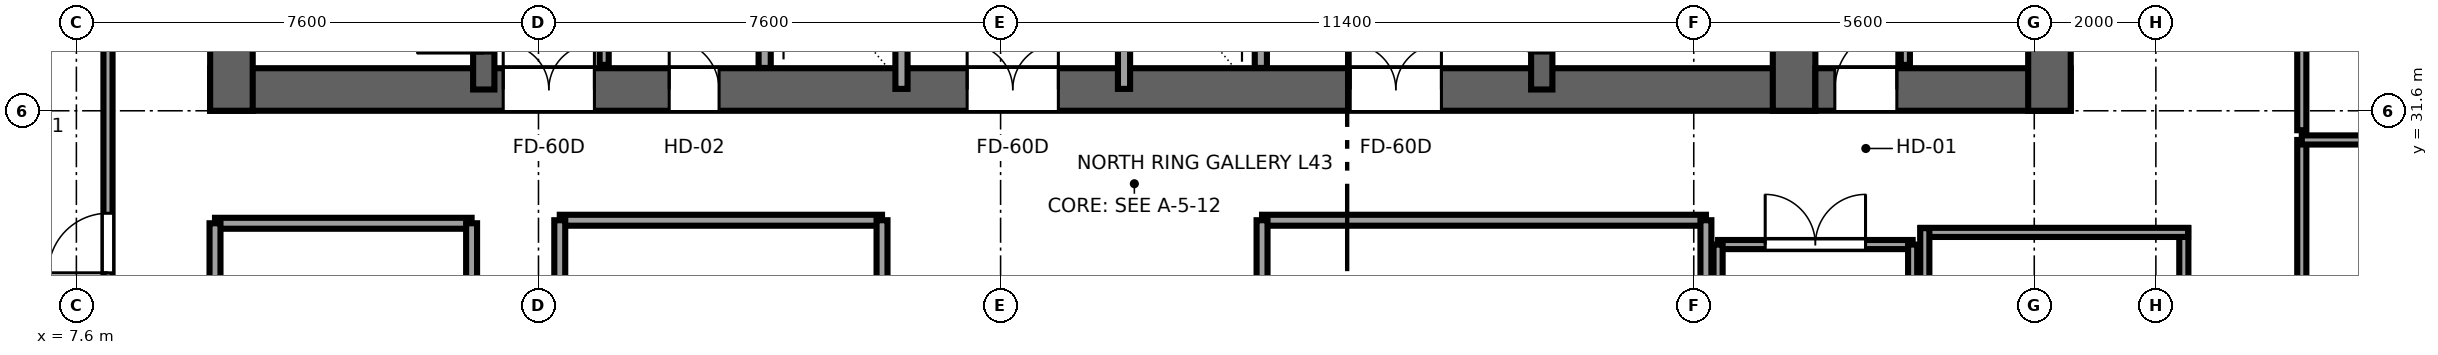
"""IFC4 building model, lengths in metres.
Left out: names, types, materials, properties, quantities, classifications, styles, units other than length and angle.
Written with IfcOpenShell. Run it as: python <this file> out.ifc"""

import sys

from ifc_helpers import new_model, si_unit, direction, frame, frame_2d, origin, place, context, subcontext, project, spatial, rectangle, extrude, source, transform, mapped, element, fill, save


model = new_model("IFC4")
c1 = context("Model", 3, precision=1e-05, world=origin(), true_north=direction((0.0, 1.0)))
c2 = subcontext(c1, "Body", "Model", "MODEL_VIEW")
j1 = project(units=[si_unit("LENGTHUNIT", "METRE"), si_unit("PLANEANGLEUNIT", "RADIAN")], contexts=[c1])
p1 = place(None, origin())
s1 = spatial("IfcSite", under=j1, at=p1, CompositionType="ELEMENT")
p2 = place(p1, origin())
s2 = spatial("IfcBuilding", under=s1, at=p2, CompositionType="ELEMENT")
p3 = place(p2, frame((0.0, 0.0, 164.8)))
s3 = spatial("IfcBuildingStorey", under=s2, at=p3, CompositionType="ELEMENT", Elevation=164.8)
p4 = place(p3, frame((9.8, 31.95, 0.0), z_axis=(0.0, 0.0, 1.0), x_axis=(1.0, 0.0, 0.0)))
e1 = element("IfcWall", 1, at=p4, inside=s3, PredefinedType="SHEAR", context=c2, shape_type="SweptSolid", body=[
    extrude(rectangle(XDim=26.4, YDim=0.7, at=frame_2d((13.2, 0.0))), origin(), (0.0, 0.0, 1.0), 3.55),
])
p5 = place(p4, frame((6.32, 0.0, 0.0), z_axis=(0.0, 0.0, 1.0), x_axis=(-1.0, 0.0, 0.0)))
e2 = element("IfcOpeningElement", 2, at=p5, cuts=e1, PredefinedType="OPENING", context=c2, shape_type="SweptSolid", body=[
    extrude(rectangle(XDim=1.5, YDim=2.04, at=frame_2d((0.75, 1.02))), frame((0.0, 0.36, 0.0), z_axis=(0.0, -1.0, 0.0), x_axis=(1.0, 0.0, 0.0)), (0.0, 0.0, 1.0), 0.72),
])
p6 = place(p4, frame((13.95, 0.0, 0.0), z_axis=(0.0, 0.0, 1.0), x_axis=(-1.0, 0.0, 0.0)))
e3 = element("IfcOpeningElement", 3, at=p6, cuts=e1, PredefinedType="OPENING", context=c2, shape_type="SweptSolid", body=[
    extrude(rectangle(XDim=1.5, YDim=2.04, at=frame_2d((0.75, 1.02))), frame((0.0, 0.36, 0.0), z_axis=(0.0, -1.0, 0.0), x_axis=(1.0, 0.0, 0.0)), (0.0, 0.0, 1.0), 0.72),
])
p7 = place(p4, frame((20.25, 0.0, 0.0), z_axis=(0.0, 0.0, 1.0), x_axis=(-1.0, 0.0, 0.0)))
e4 = element("IfcOpeningElement", 4, at=p7, cuts=e1, PredefinedType="OPENING", context=c2, shape_type="SweptSolid", body=[
    extrude(rectangle(XDim=1.5, YDim=2.04, at=frame_2d((0.75, 1.02))), frame((0.0, 0.36, 0.0), z_axis=(0.0, -1.0, 0.0), x_axis=(1.0, 0.0, 0.0)), (0.0, 0.0, 1.0), 0.72),
])
p8 = place(p4, frame((8.37, 0.0, 0.0), z_axis=(0.0, 0.0, 1.0), x_axis=(-1.0, 0.0, 0.0)))
e5 = element("IfcOpeningElement", 5, at=p8, cuts=e1, PredefinedType="OPENING", context=c2, shape_type="SweptSolid", body=[
    extrude(rectangle(XDim=0.82, YDim=2.01, at=frame_2d((0.41, 1.005))), frame((0.0, 0.36, 0.0), z_axis=(0.0, -1.0, 0.0), x_axis=(1.0, 0.0, 0.0)), (0.0, 0.0, 1.0), 0.72),
])
for number, where, z_axis, x_axis in (
    (6, (10.15, 31.6, 0.0), (0.0, 0.0, 1.0), (0.0, 1.0, 0.0)),
    (7, (35.85, 31.6, 0.0), (0.0, 0.0, 1.0), (0.0, 1.0, 0.0)),
):
    element("IfcWall", number, at=place(p3, frame(where, z_axis=z_axis, x_axis=x_axis)), inside=s3, PredefinedType="SHEAR", context=c2, shape_type="SweptSolid", body=[
        extrude(rectangle(XDim=13.6, YDim=0.7, at=frame_2d((6.8, 0.0))), origin(), (0.0, 0.0, 1.0), 3.55),
    ])
p9 = place(p3, frame((14.3, 31.95, 0.0), z_axis=(0.0, 0.0, 1.0), x_axis=(0.0, 1.0, 0.0)))
e8 = element("IfcWall", 8, at=p9, inside=s3, PredefinedType="SHEAR", context=c2, shape_type="SweptSolid", body=[
    extrude(rectangle(XDim=12.9, YDim=0.35, at=frame_2d((6.45, 0.0))), origin(), (0.0, 0.0, 1.0), 3.55),
])
p10 = place(p9, frame((0.6, 0.0, 0.0)))
e9 = element("IfcOpeningElement", 9, at=p10, cuts=e8, PredefinedType="OPENING", context=c2, shape_type="SweptSolid", body=[
    extrude(rectangle(XDim=1.1, YDim=2.12, at=frame_2d((0.55, 1.06))), frame((0.0, 0.185, 0.0), z_axis=(0.0, -1.0, 0.0), x_axis=(1.0, 0.0, 0.0)), (0.0, 0.0, 1.0), 0.37),
])
p11 = place(p3, frame((31.7, 31.95, 0.0), z_axis=(0.0, 0.0, 1.0), x_axis=(0.0, 1.0, 0.0)))
e10 = element("IfcWall", 10, at=p11, inside=s3, PredefinedType="SHEAR", context=c2, shape_type="SweptSolid", body=[
    extrude(rectangle(XDim=12.9, YDim=0.35, at=frame_2d((6.45, 0.0))), origin(), (0.0, 0.0, 1.0), 3.55),
])
p12 = place(p11, frame((1.7, 0.0, 0.0), z_axis=(0.0, 0.0, 1.0), x_axis=(-1.0, 0.0, 0.0)))
e11 = element("IfcOpeningElement", 11, at=p12, cuts=e10, PredefinedType="OPENING", context=c2, shape_type="SweptSolid", body=[
    extrude(rectangle(XDim=1.1, YDim=2.12, at=frame_2d((0.55, 1.06))), frame((0.0, 0.185, 0.0), z_axis=(0.0, -1.0, 0.0), x_axis=(1.0, 0.0, 0.0)), (0.0, 0.0, 1.0), 0.37),
])
p13 = place(p3, frame((36.2, 31.95, 0.0), z_axis=(0.0, 0.0, 1.0), x_axis=(1.0, 0.0, 0.0)))
e12 = element("IfcWall", 12, at=p13, inside=s3, PredefinedType="SHEAR", context=c2, shape_type="SweptSolid", body=[
    extrude(rectangle(XDim=4.2, YDim=0.7, at=frame_2d((2.1, 0.0))), origin(), (0.0, 0.0, 1.0), 3.55),
])
p14 = place(p13, frame((1.34, 0.0, 0.0), z_axis=(0.0, 0.0, 1.0), x_axis=(-1.0, 0.0, 0.0)))
e13 = element("IfcOpeningElement", 13, at=p14, cuts=e12, PredefinedType="OPENING", context=c2, shape_type="SweptSolid", body=[
    extrude(rectangle(XDim=1.02, YDim=2.03, at=frame_2d((0.51, 1.015))), frame((0.0, 0.36, 0.0), z_axis=(0.0, -1.0, 0.0), x_axis=(1.0, 0.0, 0.0)), (0.0, 0.0, 1.0), 0.72),
])
p15 = place(p3, frame((40.05, 31.6, 0.0), z_axis=(0.0, 0.0, 1.0), x_axis=(0.0, 1.0, 0.0)))
e14 = element("IfcWall", 14, at=p15, inside=s3, PredefinedType="SHEAR", context=c2, shape_type="SweptSolid", body=[
    extrude(rectangle(XDim=13.6, YDim=0.7, at=frame_2d((6.8, 0.0))), origin(), (0.0, 0.0, 1.0), 3.55),
])
for number, where, z_axis, x_axis in (
    (15, (18.92, 32.304, 0.0), (0.0, 0.0, 1.0), (0.0, 1.0, 0.0)),
    (16, (27.08, 32.304, 0.0), (0.0, 0.0, 1.0), (0.0, 1.0, 0.0)),
):
    element("IfcWall", number, at=place(p3, frame(where, z_axis=z_axis, x_axis=x_axis)), inside=s3, PredefinedType="SOLIDWALL", context=c2, shape_type="SweptSolid", body=[
        extrude(rectangle(XDim=3.846, YDim=0.2, at=frame_2d((1.923, 0.0))), origin(), (0.0, 0.0, 1.0), 3.37),
    ])
p16 = place(p3, frame((21.17, 31.96, 0.0), z_axis=(0.0, 0.0, 1.0), x_axis=(0.0, 1.0, 0.0)))
e17 = element("IfcWall", 17, at=p16, inside=s3, PredefinedType="SOLIDWALL", context=c2, shape_type="SweptSolid", body=[
    extrude(rectangle(XDim=12.58, YDim=0.2, at=frame_2d((6.29, 0.0))), origin(), (0.0, 0.0, 1.0), 3.37),
])
p17 = place(p16, frame((5.74, 0.0, 0.0)))
e18 = element("IfcOpeningElement", 18, at=p17, cuts=e17, PredefinedType="OPENING", context=c2, shape_type="SweptSolid", body=[
    extrude(rectangle(XDim=1.1, YDim=2.12, at=frame_2d((0.55, 1.06))), frame((0.0, 0.11, 0.0), z_axis=(0.0, -1.0, 0.0), x_axis=(1.0, 0.0, 0.0)), (0.0, 0.0, 1.0), 0.22),
])
p18 = place(p16, frame((8.24, 0.0, 0.0)))
e19 = element("IfcOpeningElement", 19, at=p18, cuts=e17, PredefinedType="OPENING", context=c2, shape_type="SweptSolid", body=[
    extrude(rectangle(XDim=1.1, YDim=2.12, at=frame_2d((0.55, 1.06))), frame((0.0, 0.11, 0.0), z_axis=(0.0, -1.0, 0.0), x_axis=(1.0, 0.0, 0.0)), (0.0, 0.0, 1.0), 0.22),
])
p19 = place(p3, frame((24.83, 31.96, 0.0), z_axis=(0.0, 0.0, 1.0), x_axis=(0.0, 1.0, 0.0)))
e20 = element("IfcWall", 20, at=p19, inside=s3, PredefinedType="SOLIDWALL", context=c2, shape_type="SweptSolid", body=[
    extrude(rectangle(XDim=12.58, YDim=0.2, at=frame_2d((6.29, 0.0))), origin(), (0.0, 0.0, 1.0), 3.37),
])
p20 = place(p19, frame((5.74, 0.0, 0.0)))
e21 = element("IfcOpeningElement", 21, at=p20, cuts=e20, PredefinedType="OPENING", context=c2, shape_type="SweptSolid", body=[
    extrude(rectangle(XDim=1.1, YDim=2.12, at=frame_2d((0.55, 1.06))), frame((0.0, 0.11, 0.0), z_axis=(0.0, -1.0, 0.0), x_axis=(1.0, 0.0, 0.0)), (0.0, 0.0, 1.0), 0.22),
])
p21 = place(p19, frame((8.24, 0.0, 0.0)))
e22 = element("IfcOpeningElement", 22, at=p21, cuts=e20, PredefinedType="OPENING", context=c2, shape_type="SweptSolid", body=[
    extrude(rectangle(XDim=1.1, YDim=2.12, at=frame_2d((0.55, 1.06))), frame((0.0, 0.11, 0.0), z_axis=(0.0, -1.0, 0.0), x_axis=(1.0, 0.0, 0.0)), (0.0, 0.0, 1.0), 0.22),
])
p22 = place(p3, frame((16.28, 32.355, 0.0), z_axis=(0.0, 0.0, 1.0), x_axis=(0.0, 1.0, 0.0)))
e23 = element("IfcWall", 23, at=p22, inside=s3, PredefinedType="PARTITIONING", context=c2, shape_type="SweptSolid", body=[
    extrude(rectangle(XDim=0.865, YDim=0.15, at=frame_2d((0.433, 0.0))), origin(), (0.0, 0.0, 1.0), 3.37),
])
p23 = place(p3, frame((37.68, 32.355, 0.0), z_axis=(0.0, 0.0, 1.0), x_axis=(0.0, 1.0, 0.0)))
e24 = element("IfcWall", 24, at=p23, inside=s3, PredefinedType="PARTITIONING", context=c2, shape_type="SweptSolid", body=[
    extrude(rectangle(XDim=3.845, YDim=0.15, at=frame_2d((1.922, 0.0))), origin(), (0.0, 0.0, 1.0), 3.37),
])
p24 = place(p23, frame((1.413, 0.0, 0.0)))
e25 = element("IfcOpeningElement", 25, at=p24, cuts=e24, PredefinedType="OPENING", context=c2, shape_type="SweptSolid", body=[
    extrude(rectangle(XDim=1.02, YDim=2.03, at=frame_2d((0.51, 1.015))), frame((0.0, 0.085, 0.0), z_axis=(0.0, -1.0, 0.0), x_axis=(1.0, 0.0, 0.0)), (0.0, 0.0, 1.0), 0.17),
])
p25 = place(p3, frame((8.12, 24.73, 0.0), z_axis=(0.0, 0.0, 1.0), x_axis=(0.0, 1.0, 0.0)))
e26 = element("IfcWall", 26, at=p25, inside=s3, PredefinedType="PARTITIONING", context=c2, shape_type="SweptSolid", body=[
    extrude(rectangle(XDim=9.39, YDim=0.15, at=frame_2d((4.695, 0.0))), origin(), (0.0, 0.0, 1.0), 3.37),
])
p26 = place(p25, frame((4.205, 0.0, 0.0)))
e27 = element("IfcOpeningElement", 27, at=p26, cuts=e26, PredefinedType="OPENING", context=c2, shape_type="SweptSolid", body=[
    extrude(rectangle(XDim=0.98, YDim=2.12, at=frame_2d((0.49, 1.06))), frame((0.0, 0.085, 0.0), z_axis=(0.0, -1.0, 0.0), x_axis=(1.0, 0.0, 0.0)), (0.0, 0.0, 1.0), 0.17),
])
p27 = place(p3, frame((44.2, 23.78, 0.0), z_axis=(0.0, 0.0, 1.0), x_axis=(0.0, 1.0, 0.0)))
e28 = element("IfcWall", 28, at=p27, inside=s3, PredefinedType="PARTITIONING", context=c2, shape_type="SweptSolid", body=[
    extrude(rectangle(XDim=7.34, YDim=0.15, at=frame_2d((3.67, 0.0))), origin(), (0.0, 0.0, 1.0), 3.37),
])
p28 = place(p27, frame((3.18, 0.0, 0.0)))
e29 = element("IfcOpeningElement", 29, at=p28, cuts=e28, PredefinedType="OPENING", context=c2, shape_type="SweptSolid", body=[
    extrude(rectangle(XDim=0.98, YDim=2.12, at=frame_2d((0.49, 1.06))), frame((0.0, 0.085, 0.0), z_axis=(0.0, -1.0, 0.0), x_axis=(1.0, 0.0, 0.0)), (0.0, 0.0, 1.0), 0.17),
])
p29 = place(p3, frame((44.2, 31.12, 0.0), z_axis=(0.0, 0.0, 1.0), x_axis=(1.0, 0.0, 0.0)))
e30 = element("IfcWall", 30, at=p29, inside=s3, PredefinedType="PARTITIONING", context=c2, shape_type="SweptSolid", body=[
    extrude(rectangle(XDim=7.43, YDim=0.15, at=frame_2d((3.715, 0.0))), origin(), (0.0, 0.0, 1.0), 3.37),
])
p30 = place(p3, frame((44.2, 31.28, 0.0), z_axis=(0.0, 0.0, 1.0), x_axis=(0.0, 1.0, 0.0)))
e31 = element("IfcWall", 31, at=p30, inside=s3, PredefinedType="PARTITIONING", context=c2, shape_type="SweptSolid", body=[
    extrude(rectangle(XDim=6.24, YDim=0.15, at=frame_2d((3.12, 0.0))), origin(), (0.0, 0.0, 1.0), 3.37),
])
p31 = place(p30, frame((2.63, 0.0, 0.0)))
e32 = element("IfcOpeningElement", 32, at=p31, cuts=e31, PredefinedType="OPENING", context=c2, shape_type="SweptSolid", body=[
    extrude(rectangle(XDim=0.98, YDim=2.12, at=frame_2d((0.49, 1.06))), frame((0.0, 0.085, 0.0), z_axis=(0.0, -1.0, 0.0), x_axis=(1.0, 0.0, 0.0)), (0.0, 0.0, 1.0), 0.17),
])
p32 = place(p3, frame((42.26, 25.93, 0.0), z_axis=(0.0, 0.0, 1.0), x_axis=(0.0, 1.0, 0.0)))
e33 = element("IfcWall", 33, at=p32, inside=s3, PredefinedType="PARTITIONING", context=c2, shape_type="SweptSolid", body=[
    extrude(rectangle(XDim=3.74, YDim=0.15, at=frame_2d((1.87, 0.0))), origin(), (0.0, 0.0, 1.0), 3.37),
])
p33 = place(p32, frame((1.19, 0.0, 0.0)))
e34 = element("IfcOpeningElement", 34, at=p33, cuts=e33, PredefinedType="OPENING", context=c2, shape_type="SweptSolid", body=[
    extrude(rectangle(XDim=0.92, YDim=2.01, at=frame_2d((0.46, 1.005))), frame((0.0, 0.085, 0.0), z_axis=(0.0, -1.0, 0.0), x_axis=(1.0, 0.0, 0.0)), (0.0, 0.0, 1.0), 0.17),
])
p34 = place(p3, frame((37.93, 29.6, 0.0), z_axis=(0.0, 0.0, 1.0), x_axis=(1.0, 0.0, 0.0)))
e35 = element("IfcWall", 35, at=p34, inside=s3, PredefinedType="PARTITIONING", context=c2, shape_type="SweptSolid", body=[
    extrude(rectangle(XDim=4.4, YDim=0.15, at=frame_2d((2.2, 0.0))), origin(), (0.0, 0.0, 1.0), 3.37),
])
p35 = place(p3, frame((38.0, 25.93, 0.0), z_axis=(0.0, 0.0, 1.0), x_axis=(0.0, 1.0, 0.0)))
e36 = element("IfcWall", 36, at=p35, inside=s3, PredefinedType="PARTITIONING", context=c2, shape_type="SweptSolid", body=[
    extrude(rectangle(XDim=3.74, YDim=0.15, at=frame_2d((1.87, 0.0))), origin(), (0.0, 0.0, 1.0), 3.37),
])
p36 = place(p3, frame((9.88, 29.75, 0.0), z_axis=(0.0, 0.0, 1.0), x_axis=(1.0, 0.0, 0.0)))
e37 = element("IfcWall", 37, at=p36, inside=s3, PredefinedType="PARTITIONING", context=c2, shape_type="SweptSolid", body=[
    extrude(rectangle(XDim=4.22, YDim=0.18, at=frame_2d((2.11, 0.0))), origin(), (0.0, 0.0, 1.0), 3.37),
])
for number, where, z_axis, x_axis in (
    (38, (9.88, 23.7, 0.0), (0.0, 0.0, 1.0), (0.0, 1.0, 0.0)),
    (39, (14.1, 23.7, 0.0), (0.0, 0.0, 1.0), (0.0, 1.0, 0.0)),
):
    element("IfcWall", number, at=place(p3, frame(where, z_axis=z_axis, x_axis=x_axis)), inside=s3, PredefinedType="PARTITIONING", context=c2, shape_type="SweptSolid", body=[
        extrude(rectangle(XDim=6.05, YDim=0.18, at=frame_2d((3.025, 0.0))), origin(), (0.0, 0.0, 1.0), 3.37),
    ])
p37 = place(p3, frame((27.1, 29.8, 0.0), z_axis=(0.0, 0.0, 1.0), x_axis=(1.0, 0.0, 0.0)))
e40 = element("IfcWall", 40, at=p37, inside=s3, PredefinedType="PARTITIONING", context=c2, shape_type="SweptSolid", body=[
    extrude(rectangle(XDim=7.3, YDim=0.18, at=frame_2d((3.65, 0.0))), origin(), (0.0, 0.0, 1.0), 3.37),
])
for number, where, z_axis, x_axis in (
    (41, (27.1, 23.7, 0.0), (0.0, 0.0, 1.0), (0.0, 1.0, 0.0)),
    (42, (34.4, 23.7, 0.0), (0.0, 0.0, 1.0), (0.0, 1.0, 0.0)),
):
    element("IfcWall", number, at=place(p3, frame(where, z_axis=z_axis, x_axis=x_axis)), inside=s3, PredefinedType="PARTITIONING", context=c2, shape_type="SweptSolid", body=[
        extrude(rectangle(XDim=6.1, YDim=0.18, at=frame_2d((3.05, 0.0))), origin(), (0.0, 0.0, 1.0), 3.37),
    ])
p38 = place(p3, frame((15.55, 29.8, 0.0), z_axis=(0.0, 0.0, 1.0), x_axis=(1.0, 0.0, 0.0)))
e43 = element("IfcWall", 43, at=p38, inside=s3, PredefinedType="PARTITIONING", context=c2, shape_type="SweptSolid", body=[
    extrude(rectangle(XDim=5.3, YDim=0.18, at=frame_2d((2.65, 0.0))), origin(), (0.0, 0.0, 1.0), 3.37),
])
for number, where, z_axis, x_axis in (
    (44, (15.55, 23.7, 0.0), (0.0, 0.0, 1.0), (0.0, 1.0, 0.0)),
    (45, (20.85, 23.7, 0.0), (0.0, 0.0, 1.0), (0.0, 1.0, 0.0)),
):
    element("IfcWall", number, at=place(p3, frame(where, z_axis=z_axis, x_axis=x_axis)), inside=s3, PredefinedType="PARTITIONING", context=c2, shape_type="SweptSolid", body=[
        extrude(rectangle(XDim=6.1, YDim=0.18, at=frame_2d((3.05, 0.0))), origin(), (0.0, 0.0, 1.0), 3.37),
    ])
p39 = place(p3, frame((34.6, 29.4, 0.0), z_axis=(0.0, 0.0, 1.0), x_axis=(1.0, 0.0, 0.0)))
e46 = element("IfcWall", 46, at=p39, inside=s3, PredefinedType="PARTITIONING", context=c2, shape_type="SweptSolid", body=[
    extrude(rectangle(XDim=3.2, YDim=0.15, at=frame_2d((1.6, 0.0))), origin(), (0.0, 0.0, 1.0), 3.37),
])
p40 = place(p39, frame((0.775, 0.0, 0.0)))
e47 = element("IfcOpeningElement", 47, at=p40, cuts=e46, PredefinedType="OPENING", context=c2, shape_type="SweptSolid", body=[
    extrude(rectangle(XDim=1.65, YDim=2.15, at=frame_2d((0.825, 1.075))), frame((0.0, 0.085, 0.0), z_axis=(0.0, -1.0, 0.0), x_axis=(1.0, 0.0, 0.0)), (0.0, 0.0, 1.0), 0.17),
])
for number, where, z_axis, x_axis in (
    (48, (34.6, 23.7, 0.0), (0.0, 0.0, 1.0), (0.0, 1.0, 0.0)),
    (49, (37.8, 23.7, 0.0), (0.0, 0.0, 1.0), (0.0, 1.0, 0.0)),
):
    element("IfcWall", number, at=place(p3, frame(where, z_axis=z_axis, x_axis=x_axis)), inside=s3, PredefinedType="PARTITIONING", context=c2, shape_type="SweptSolid", body=[
        extrude(rectangle(XDim=5.7, YDim=0.15, at=frame_2d((2.85, 0.0))), origin(), (0.0, 0.0, 1.0), 3.37),
    ])
m1 = source(origin(), c2, "Body", "SweptSolid", [
    extrude(rectangle(XDim=1.1, YDim=2.12, at=frame_2d((0.55, 1.06))), frame((0.0, 0.025, 0.0), z_axis=(0.0, -1.0, 0.0), x_axis=(1.0, 0.0, 0.0)), (0.0, 0.0, 1.0), 0.05),
])
p41 = place(p10, origin())
e50 = element("IfcDoor", 50, at=p41, inside=s3, OperationType="SINGLE_SWING_LEFT", PredefinedType="DOOR", context=c2, shape_type="MappedRepresentation", body=[
    mapped(m1, transform((0.0, 0.0, 0.0), x_axis=(1.0, 0.0, 0.0), y_axis=(0.0, 1.0, 0.0), z_axis=(0.0, 0.0, 1.0), scale=1.0)),
])
fill(e9, e50)
p42 = place(p12, origin())
e51 = element("IfcDoor", 51, at=p42, inside=s3, OperationType="SINGLE_SWING_RIGHT", PredefinedType="DOOR", context=c2, shape_type="MappedRepresentation", body=[
    mapped(m1, transform((0.0, 0.0, 0.0), x_axis=(1.0, 0.0, 0.0), y_axis=(0.0, 1.0, 0.0), z_axis=(0.0, 0.0, 1.0), scale=1.0)),
])
fill(e11, e51)
m2 = source(origin(), c2, "Body", "SweptSolid", [
    extrude(rectangle(XDim=1.5, YDim=2.04, at=frame_2d((0.75, 1.02))), frame((0.0, 0.025, 0.0), z_axis=(0.0, -1.0, 0.0), x_axis=(1.0, 0.0, 0.0)), (0.0, 0.0, 1.0), 0.05),
])
p43 = place(p5, origin())
e52 = element("IfcDoor", 52, at=p43, inside=s3, OperationType="DOUBLE_DOOR_SINGLE_SWING", PredefinedType="DOOR", context=c2, shape_type="MappedRepresentation", body=[
    mapped(m2, transform((0.0, 0.0, 0.0), x_axis=(1.0, 0.0, 0.0), y_axis=(0.0, 1.0, 0.0), z_axis=(0.0, 0.0, 1.0), scale=1.0)),
])
fill(e2, e52)
p44 = place(p6, origin())
e53 = element("IfcDoor", 53, at=p44, inside=s3, OperationType="DOUBLE_DOOR_SINGLE_SWING", PredefinedType="DOOR", context=c2, shape_type="MappedRepresentation", body=[
    mapped(m2, transform((0.0, 0.0, 0.0), x_axis=(1.0, 0.0, 0.0), y_axis=(0.0, 1.0, 0.0), z_axis=(0.0, 0.0, 1.0), scale=1.0)),
])
fill(e3, e53)
p45 = place(p7, origin())
e54 = element("IfcDoor", 54, at=p45, inside=s3, OperationType="DOUBLE_DOOR_SINGLE_SWING", PredefinedType="DOOR", context=c2, shape_type="MappedRepresentation", body=[
    mapped(m2, transform((0.0, 0.0, 0.0), x_axis=(1.0, 0.0, 0.0), y_axis=(0.0, 1.0, 0.0), z_axis=(0.0, 0.0, 1.0), scale=1.0)),
])
fill(e4, e54)
m3 = source(origin(), c2, "Body", "SweptSolid", [
    extrude(rectangle(XDim=0.82, YDim=2.01, at=frame_2d((0.41, 1.005))), frame((0.0, 0.025, 0.0), z_axis=(0.0, -1.0, 0.0), x_axis=(1.0, 0.0, 0.0)), (0.0, 0.0, 1.0), 0.05),
])
p46 = place(p8, origin())
e55 = element("IfcDoor", 55, at=p46, inside=s3, OperationType="SINGLE_SWING_LEFT", PredefinedType="DOOR", context=c2, shape_type="MappedRepresentation", body=[
    mapped(m3, transform((0.0, 0.0, 0.0), x_axis=(1.0, 0.0, 0.0), y_axis=(0.0, 1.0, 0.0), z_axis=(0.0, 0.0, 1.0), scale=1.0)),
])
fill(e5, e55)
m4 = source(origin(), c2, "Body", "SweptSolid", [
    extrude(rectangle(XDim=1.02, YDim=2.03, at=frame_2d((0.51, 1.015))), frame((0.0, 0.025, 0.0), z_axis=(0.0, -1.0, 0.0), x_axis=(1.0, 0.0, 0.0)), (0.0, 0.0, 1.0), 0.05),
])
p47 = place(p14, origin())
e56 = element("IfcDoor", 56, at=p47, inside=s3, OperationType="SINGLE_SWING_RIGHT", PredefinedType="DOOR", context=c2, shape_type="MappedRepresentation", body=[
    mapped(m4, transform((0.0, 0.0, 0.0), x_axis=(1.0, 0.0, 0.0), y_axis=(0.0, 1.0, 0.0), z_axis=(0.0, 0.0, 1.0), scale=1.0)),
])
fill(e13, e56)
m5 = source(origin(), c2, "Body", "SweptSolid", [
    extrude(rectangle(XDim=0.98, YDim=2.12, at=frame_2d((0.49, 1.06))), frame((0.0, 0.025, 0.0), z_axis=(0.0, -1.0, 0.0), x_axis=(1.0, 0.0, 0.0)), (0.0, 0.0, 1.0), 0.05),
])
p48 = place(p26, origin())
e57 = element("IfcDoor", 57, at=p48, inside=s3, OperationType="SINGLE_SWING_LEFT", PredefinedType="DOOR", context=c2, shape_type="MappedRepresentation", body=[
    mapped(m5, transform((0.0, 0.0, 0.0), x_axis=(1.0, 0.0, 0.0), y_axis=(0.0, 1.0, 0.0), z_axis=(0.0, 0.0, 1.0), scale=1.0)),
])
fill(e27, e57)
m6 = source(origin(), c2, "Body", "SweptSolid", [
    extrude(rectangle(XDim=1.65, YDim=2.15, at=frame_2d((0.825, 1.075))), frame((0.0, 0.025, 0.0), z_axis=(0.0, -1.0, 0.0), x_axis=(1.0, 0.0, 0.0)), (0.0, 0.0, 1.0), 0.05),
])
p49 = place(p40, origin())
e58 = element("IfcDoor", 58, at=p49, inside=s3, OperationType="DOUBLE_DOOR_SINGLE_SWING", PredefinedType="DOOR", context=c2, shape_type="MappedRepresentation", body=[
    mapped(m6, transform((0.0, 0.0, 0.0), x_axis=(1.0, 0.0, 0.0), y_axis=(0.0, 1.0, 0.0), z_axis=(0.0, 0.0, 1.0), scale=1.0)),
])
fill(e47, e58)
save(model, sys.argv[1])
